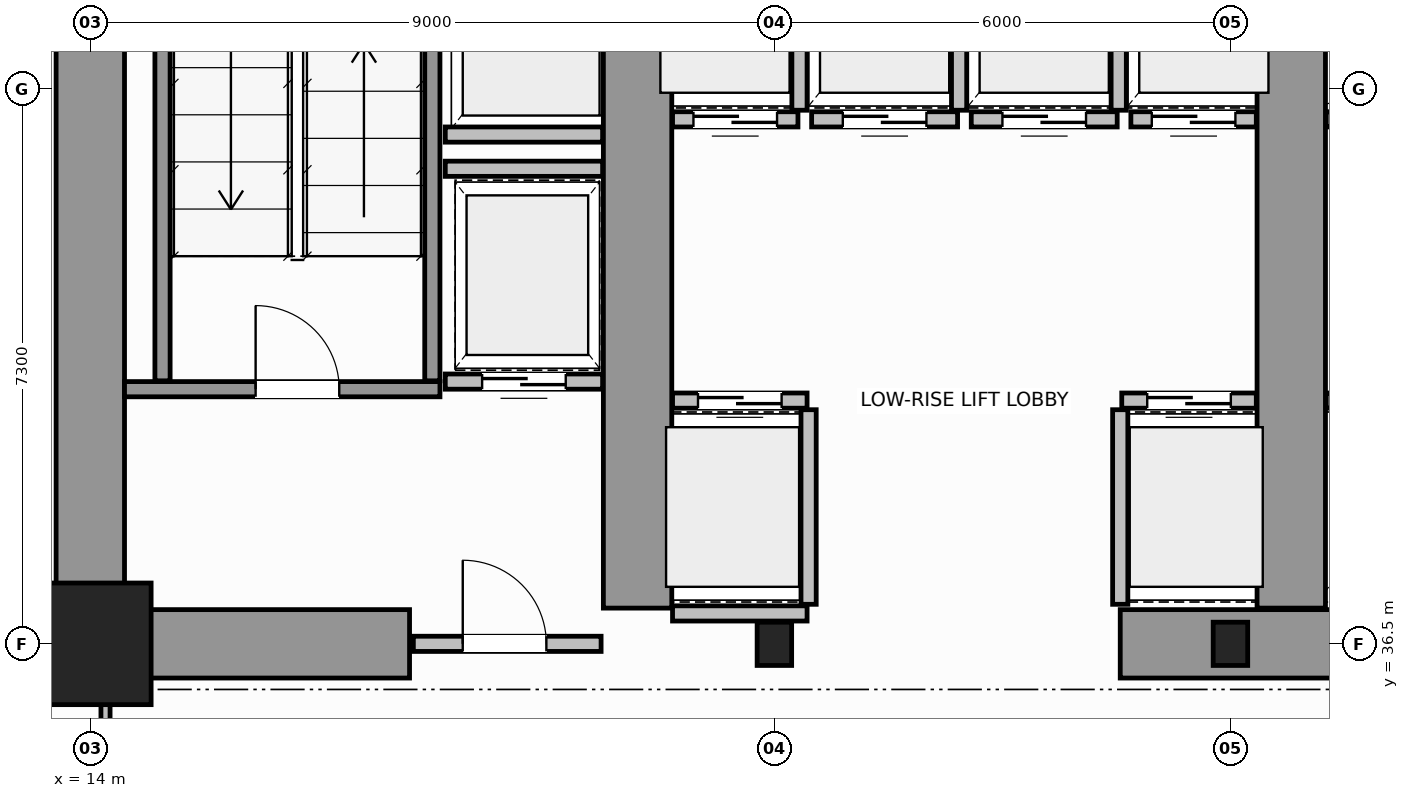
"""IFC4 building model, lengths in metres.
Left out: names, types, materials, properties, quantities, classifications, styles, units other than length and angle.
Written with IfcOpenShell. Run it as: python <this file> out.ifc"""

import sys

from ifc_helpers import new_model, si_unit, direction, frame, frame_2d, origin, origin_2d, place, context, subcontext, project, spatial, rectangle, i_section, extrude, source, transform, mapped, element, fill, save


model = new_model("IFC4")
c1 = context("Model", 3, precision=1e-05, world=origin(), true_north=direction((0.0, 1.0)))
c2 = subcontext(c1, "Body", "Model", "MODEL_VIEW")
j1 = project(units=[si_unit("LENGTHUNIT", "METRE"), si_unit("PLANEANGLEUNIT", "RADIAN")], contexts=[c1])
p1 = place(None, origin())
s1 = spatial("IfcSite", under=j1, at=p1, CompositionType="ELEMENT")
p2 = place(p1, origin())
s2 = spatial("IfcBuilding", under=s1, at=p2, CompositionType="ELEMENT")
p3 = place(p2, frame((0.0, 0.0, 53.0)))
s3 = spatial("IfcBuildingStorey", under=s2, at=p3, CompositionType="ELEMENT", Elevation=53.0)
m1 = source(origin(), c2, "Body", "SweptSolid", [
    extrude(rectangle(XDim=1.6, YDim=1.6, at=origin_2d()), origin(), (0.0, 0.0, 1.0), 3.8),
])
p4 = place(p3, frame((14.0, 36.5, 0.0), z_axis=(0.0, 0.0, 1.0), x_axis=(1.0, 0.0, 0.0)))
e1 = element("IfcColumn", 1, at=p4, inside=s3, PredefinedType="COLUMN", context=c2, shape_type="MappedRepresentation", body=[
    mapped(m1, transform((0.0, 0.0, 0.0), scale=1.0)),
])
m2 = source(origin(), c2, "Body", "SweptSolid", [
    extrude(i_section(OverallWidth=0.454, OverallDepth=0.569, WebThickness=0.078, FlangeThickness=0.08, FilletRadius=0.015, at=origin_2d()), origin(), (0.0, 0.0, 1.0), 3.8),
])
for number, where, z_axis, x_axis in (
    (2, (23.0, 36.5, 0.0), (0.0, 0.0, 1.0), (1.0, 0.0, 0.0)),
    (3, (29.0, 36.5, 0.0), (0.0, 0.0, 1.0), (1.0, 0.0, 0.0)),
):
    element("IfcColumn", number, at=place(p3, frame(where, z_axis=z_axis, x_axis=x_axis)), inside=s3, PredefinedType="COLUMN", context=c2, shape_type="MappedRepresentation", body=[
        mapped(m2, transform((0.0, 0.0, 0.0), scale=1.0)),
    ])
p5 = place(p3, frame((14.0, 36.5, 0.0), z_axis=(0.0, 0.0, 1.0), x_axis=(0.0, 1.0, 0.0)))
e4 = element("IfcWall", 4, at=p5, inside=s3, PredefinedType="SHEAR", context=c2, shape_type="SweptSolid", body=[
    extrude(rectangle(XDim=14.5, YDim=0.9, at=frame_2d((7.25, 0.0))), origin(), (0.0, 0.0, 1.0), 3.8),
])
p6 = place(p3, frame((14.47, 36.5, 0.0), z_axis=(0.0, 0.0, 1.0), x_axis=(1.0, 0.0, 0.0)))
e5 = element("IfcWall", 5, at=p6, inside=s3, PredefinedType="SHEAR", context=c2, shape_type="SweptSolid", body=[
    extrude(rectangle(XDim=3.73, YDim=0.9, at=frame_2d((1.865, 0.0))), origin(), (0.0, 0.0, 1.0), 2.38),
])
p7 = place(p3, frame((27.55, 36.5, 0.0), z_axis=(0.0, 0.0, 1.0), x_axis=(1.0, 0.0, 0.0)))
e6 = element("IfcWall", 6, at=p7, inside=s3, PredefinedType="SHEAR", context=c2, shape_type="SweptSolid", body=[
    extrude(rectangle(XDim=4.5, YDim=0.9, at=frame_2d((2.25, 0.0))), origin(), (0.0, 0.0, 1.0), 3.8),
])
for number, where, z_axis, x_axis in (
    (7, (21.2, 36.97, 0.0), (0.0, 0.0, 1.0), (0.0, 1.0, 0.0)),
    (8, (29.8, 36.97, 0.0), (0.0, 0.0, 1.0), (0.0, 1.0, 0.0)),
):
    element("IfcWall", number, at=place(p3, frame(where, z_axis=z_axis, x_axis=x_axis)), inside=s3, PredefinedType="SHEAR", context=c2, shape_type="SweptSolid", body=[
        extrude(rectangle(XDim=9.23, YDim=0.9, at=frame_2d((4.615, 0.0))), origin(), (0.0, 0.0, 1.0), 3.8),
    ])
p8 = place(p3, frame((14.45, 39.85, 0.0), z_axis=(0.0, 0.0, 1.0), x_axis=(1.0, 0.0, 0.0)))
e9 = element("IfcWall", 9, at=p8, inside=s3, PredefinedType="SOLIDWALL", context=c2, shape_type="SweptSolid", body=[
    extrude(rectangle(XDim=4.15, YDim=0.2, at=frame_2d((2.075, 0.0))), origin(), (0.0, 0.0, 1.0), 3.8),
])
p9 = place(p8, frame((1.725, 0.0, 0.0)))
e10 = element("IfcOpeningElement", 10, at=p9, cuts=e9, PredefinedType="OPENING", context=c2, shape_type="SweptSolid", body=[
    extrude(rectangle(XDim=1.1, YDim=2.15, at=frame_2d((0.55, 1.075))), frame((0.0, 0.11, 0.0), z_axis=(0.0, -1.0, 0.0), x_axis=(1.0, 0.0, 0.0)), (0.0, 0.0, 1.0), 0.22),
])
for number, where, z_axis, x_axis in (
    (11, (14.95, 39.96, 0.0), (0.0, 0.0, 1.0), (0.0, 1.0, 0.0)),
    (12, (18.5, 39.96, 0.0), (0.0, 0.0, 1.0), (0.0, 1.0, 0.0)),
):
    element("IfcWall", number, at=place(p3, frame(where, z_axis=z_axis, x_axis=x_axis)), inside=s3, PredefinedType="SOLIDWALL", context=c2, shape_type="SweptSolid", body=[
        extrude(rectangle(XDim=9.93, YDim=0.2, at=frame_2d((4.965, 0.0))), origin(), (0.0, 0.0, 1.0), 3.8),
    ])
p10 = place(p3, frame((18.25, 36.5, 0.0), z_axis=(0.0, 0.0, 1.0), x_axis=(1.0, 0.0, 0.0)))
e13 = element("IfcWall", 13, at=p10, inside=s3, PredefinedType="SOLIDWALL", context=c2, shape_type="SweptSolid", body=[
    extrude(rectangle(XDim=2.47, YDim=0.2, at=frame_2d((1.235, 0.0))), origin(), (0.0, 0.0, 1.0), 2.37),
])
p11 = place(p10, frame((0.65, 0.0, 0.0)))
e14 = element("IfcOpeningElement", 14, at=p11, cuts=e13, PredefinedType="OPENING", context=c2, shape_type="SweptSolid", body=[
    extrude(rectangle(XDim=1.1, YDim=2.15, at=frame_2d((0.55, 1.075))), frame((0.0, 0.11, 0.0), z_axis=(0.0, -1.0, 0.0), x_axis=(1.0, 0.0, 0.0)), (0.0, 0.0, 1.0), 0.22),
])
p12 = place(p3, frame((21.66, 39.7, 0.0), z_axis=(0.0, 0.0, 1.0), x_axis=(1.0, 0.0, 0.0)))
e15 = element("IfcWall", 15, at=p12, inside=s3, PredefinedType="SOLIDWALL", context=c2, shape_type="SweptSolid", body=[
    extrude(rectangle(XDim=1.77, YDim=0.2, at=frame_2d((0.885, 0.0))), origin(), (0.0, 0.0, 1.0), 3.58),
])
p13 = place(p12, frame((0.335, 0.0, 0.0)))
e16 = element("IfcOpeningElement", 16, at=p13, cuts=e15, PredefinedType="OPENING", context=c2, shape_type="SweptSolid", body=[
    extrude(rectangle(XDim=1.1, YDim=2.15, at=frame_2d((0.55, 1.075))), frame((0.0, 0.11, 0.0), z_axis=(0.0, -1.0, 0.0), x_axis=(1.0, 0.0, 0.0)), (0.0, 0.0, 1.0), 0.22),
])
p14 = place(p3, frame((21.66, 36.9, 0.0), z_axis=(0.0, 0.0, 1.0), x_axis=(1.0, 0.0, 0.0)))
e17 = element("IfcWall", 17, at=p14, inside=s3, PredefinedType="SOLIDWALL", context=c2, shape_type="SweptSolid", body=[
    extrude(rectangle(XDim=1.77, YDim=0.2, at=frame_2d((0.885, 0.0))), origin(), (0.0, 0.0, 1.0), 2.37),
])
p15 = place(p3, frame((23.45, 37.02, 0.0), z_axis=(0.0, 0.0, 1.0), x_axis=(0.0, 1.0, 0.0)))
e18 = element("IfcWall", 18, at=p15, inside=s3, PredefinedType="SOLIDWALL", context=c2, shape_type="SweptSolid", body=[
    extrude(rectangle(XDim=2.56, YDim=0.2, at=frame_2d((1.28, 0.0))), origin(), (0.0, 0.0, 1.0), 3.58),
])
p16 = place(p3, frame((27.57, 39.7, 0.0), z_axis=(0.0, 0.0, 1.0), x_axis=(1.0, 0.0, 0.0)))
e19 = element("IfcWall", 19, at=p16, inside=s3, PredefinedType="SOLIDWALL", context=c2, shape_type="SweptSolid", body=[
    extrude(rectangle(XDim=1.77, YDim=0.2, at=frame_2d((0.885, 0.0))), origin(), (0.0, 0.0, 1.0), 3.58),
])
p17 = place(p16, frame((0.335, 0.0, 0.0)))
e20 = element("IfcOpeningElement", 20, at=p17, cuts=e19, PredefinedType="OPENING", context=c2, shape_type="SweptSolid", body=[
    extrude(rectangle(XDim=1.1, YDim=2.15, at=frame_2d((0.55, 1.075))), frame((0.0, 0.11, 0.0), z_axis=(0.0, -1.0, 0.0), x_axis=(1.0, 0.0, 0.0)), (0.0, 0.0, 1.0), 0.22),
])
p18 = place(p3, frame((27.55, 37.02, 0.0), z_axis=(0.0, 0.0, 1.0), x_axis=(0.0, 1.0, 0.0)))
e21 = element("IfcWall", 21, at=p18, inside=s3, PredefinedType="SOLIDWALL", context=c2, shape_type="SweptSolid", body=[
    extrude(rectangle(XDim=2.56, YDim=0.2, at=frame_2d((1.28, 0.0))), origin(), (0.0, 0.0, 1.0), 3.58),
])
p19 = place(p3, frame((21.66, 43.4, 0.0), z_axis=(0.0, 0.0, 1.0), x_axis=(1.0, 0.0, 0.0)))
e22 = element("IfcWall", 22, at=p19, inside=s3, PredefinedType="SOLIDWALL", context=c2, shape_type="SweptSolid", body=[
    extrude(rectangle(XDim=1.65, YDim=0.2, at=frame_2d((0.825, 0.0))), origin(), (0.0, 0.0, 1.0), 3.58),
])
p20 = place(p19, frame((0.275, 0.0, 0.0)))
e23 = element("IfcOpeningElement", 23, at=p20, cuts=e22, PredefinedType="OPENING", context=c2, shape_type="SweptSolid", body=[
    extrude(rectangle(XDim=1.1, YDim=2.15, at=frame_2d((0.55, 1.075))), frame((0.0, 0.11, 0.0), z_axis=(0.0, -1.0, 0.0), x_axis=(1.0, 0.0, 0.0)), (0.0, 0.0, 1.0), 0.22),
])
p21 = place(p3, frame((23.33, 43.52, 0.0), z_axis=(0.0, 0.0, 1.0), x_axis=(0.0, 1.0, 0.0)))
e24 = element("IfcWall", 24, at=p21, inside=s3, PredefinedType="SOLIDWALL", context=c2, shape_type="SweptSolid", body=[
    extrude(rectangle(XDim=2.56, YDim=0.2, at=frame_2d((1.28, 0.0))), origin(), (0.0, 0.0, 1.0), 3.58),
])
p22 = place(p3, frame((23.49, 43.4, 0.0), z_axis=(0.0, 0.0, 1.0), x_axis=(1.0, 0.0, 0.0)))
e25 = element("IfcWall", 25, at=p22, inside=s3, PredefinedType="SOLIDWALL", context=c2, shape_type="SweptSolid", body=[
    extrude(rectangle(XDim=1.92, YDim=0.2, at=frame_2d((0.96, 0.0))), origin(), (0.0, 0.0, 1.0), 3.58),
])
p23 = place(p22, frame((0.41, 0.0, 0.0)))
e26 = element("IfcOpeningElement", 26, at=p23, cuts=e25, PredefinedType="OPENING", context=c2, shape_type="SweptSolid", body=[
    extrude(rectangle(XDim=1.1, YDim=2.15, at=frame_2d((0.55, 1.075))), frame((0.0, 0.11, 0.0), z_axis=(0.0, -1.0, 0.0), x_axis=(1.0, 0.0, 0.0)), (0.0, 0.0, 1.0), 0.22),
])
p24 = place(p3, frame((25.43, 43.52, 0.0), z_axis=(0.0, 0.0, 1.0), x_axis=(0.0, 1.0, 0.0)))
e27 = element("IfcWall", 27, at=p24, inside=s3, PredefinedType="SOLIDWALL", context=c2, shape_type="SweptSolid", body=[
    extrude(rectangle(XDim=2.56, YDim=0.2, at=frame_2d((1.28, 0.0))), origin(), (0.0, 0.0, 1.0), 3.58),
])
p25 = place(p3, frame((25.59, 43.4, 0.0), z_axis=(0.0, 0.0, 1.0), x_axis=(1.0, 0.0, 0.0)))
e28 = element("IfcWall", 28, at=p25, inside=s3, PredefinedType="SOLIDWALL", context=c2, shape_type="SweptSolid", body=[
    extrude(rectangle(XDim=1.92, YDim=0.2, at=frame_2d((0.96, 0.0))), origin(), (0.0, 0.0, 1.0), 3.58),
])
p26 = place(p25, frame((0.41, 0.0, 0.0)))
e29 = element("IfcOpeningElement", 29, at=p26, cuts=e28, PredefinedType="OPENING", context=c2, shape_type="SweptSolid", body=[
    extrude(rectangle(XDim=1.1, YDim=2.15, at=frame_2d((0.55, 1.075))), frame((0.0, 0.11, 0.0), z_axis=(0.0, -1.0, 0.0), x_axis=(1.0, 0.0, 0.0)), (0.0, 0.0, 1.0), 0.22),
])
p27 = place(p3, frame((27.53, 43.52, 0.0), z_axis=(0.0, 0.0, 1.0), x_axis=(0.0, 1.0, 0.0)))
e30 = element("IfcWall", 30, at=p27, inside=s3, PredefinedType="SOLIDWALL", context=c2, shape_type="SweptSolid", body=[
    extrude(rectangle(XDim=2.56, YDim=0.2, at=frame_2d((1.28, 0.0))), origin(), (0.0, 0.0, 1.0), 3.58),
])
p28 = place(p3, frame((27.69, 43.4, 0.0), z_axis=(0.0, 0.0, 1.0), x_axis=(1.0, 0.0, 0.0)))
e31 = element("IfcWall", 31, at=p28, inside=s3, PredefinedType="SOLIDWALL", context=c2, shape_type="SweptSolid", body=[
    extrude(rectangle(XDim=1.65, YDim=0.2, at=frame_2d((0.825, 0.0))), origin(), (0.0, 0.0, 1.0), 3.58),
])
p29 = place(p28, frame((0.275, 0.0, 0.0)))
e32 = element("IfcOpeningElement", 32, at=p29, cuts=e31, PredefinedType="OPENING", context=c2, shape_type="SweptSolid", body=[
    extrude(rectangle(XDim=1.1, YDim=2.15, at=frame_2d((0.55, 1.075))), frame((0.0, 0.11, 0.0), z_axis=(0.0, -1.0, 0.0), x_axis=(1.0, 0.0, 0.0)), (0.0, 0.0, 1.0), 0.22),
])
p30 = place(p3, frame((30.26, 39.7, 0.0), z_axis=(0.0, 0.0, 1.0), x_axis=(1.0, 0.0, 0.0)))
e33 = element("IfcWall", 33, at=p30, inside=s3, PredefinedType="SOLIDWALL", context=c2, shape_type="SweptSolid", body=[
    extrude(rectangle(XDim=1.77, YDim=0.2, at=frame_2d((0.885, 0.0))), origin(), (0.0, 0.0, 1.0), 3.58),
])
p31 = place(p3, frame((30.26, 43.4, 0.0), z_axis=(0.0, 0.0, 1.0), x_axis=(1.0, 0.0, 0.0)))
e34 = element("IfcWall", 34, at=p31, inside=s3, PredefinedType="SOLIDWALL", context=c2, shape_type="SweptSolid", body=[
    extrude(rectangle(XDim=1.65, YDim=0.2, at=frame_2d((0.825, 0.0))), origin(), (0.0, 0.0, 1.0), 3.58),
])
p32 = place(p3, frame((18.67, 43.2, 0.0), z_axis=(0.0, 0.0, 1.0), x_axis=(1.0, 0.0, 0.0)))
e35 = element("IfcWall", 35, at=p32, inside=s3, PredefinedType="SOLIDWALL", context=c2, shape_type="SweptSolid", body=[
    extrude(rectangle(XDim=2.07, YDim=0.2, at=frame_2d((1.035, 0.0))), origin(), (0.0, 0.0, 1.0), 3.58),
])
p33 = place(p3, frame((18.67, 39.95, 0.0), z_axis=(0.0, 0.0, 1.0), x_axis=(1.0, 0.0, 0.0)))
e36 = element("IfcWall", 36, at=p33, inside=s3, PredefinedType="SOLIDWALL", context=c2, shape_type="SweptSolid", body=[
    extrude(rectangle(XDim=2.07, YDim=0.2, at=frame_2d((1.035, 0.0))), origin(), (0.0, 0.0, 1.0), 3.58),
])
p34 = place(p33, frame((0.485, 0.0, 0.0)))
e37 = element("IfcOpeningElement", 37, at=p34, cuts=e36, PredefinedType="OPENING", context=c2, shape_type="SweptSolid", body=[
    extrude(rectangle(XDim=1.1, YDim=2.15, at=frame_2d((0.55, 1.075))), frame((0.0, 0.11, 0.0), z_axis=(0.0, -1.0, 0.0), x_axis=(1.0, 0.0, 0.0)), (0.0, 0.0, 1.0), 0.22),
])
p35 = place(p3, frame((18.67, 42.75, 0.0), z_axis=(0.0, 0.0, 1.0), x_axis=(1.0, 0.0, 0.0)))
e38 = element("IfcWall", 38, at=p35, inside=s3, PredefinedType="SOLIDWALL", context=c2, shape_type="SweptSolid", body=[
    extrude(rectangle(XDim=2.07, YDim=0.2, at=frame_2d((1.035, 0.0))), origin(), (0.0, 0.0, 1.0), 3.58),
])
p36 = place(p3, frame((14.2, 34.16, 0.0), z_axis=(0.0, 0.0, 1.0), x_axis=(0.0, 1.0, 0.0)))
e39 = element("IfcWall", 39, at=p36, inside=s3, PredefinedType="PARTITIONING", context=c2, shape_type="SweptSolid", body=[
    extrude(rectangle(XDim=2.28, YDim=0.12, at=frame_2d((1.14, 0.0))), origin(), (0.0, 0.0, 1.0), 3.58),
])
p37 = place(p36, frame((0.3, 0.0, 0.0)))
e40 = element("IfcOpeningElement", 40, at=p37, cuts=e39, PredefinedType="OPENING", context=c2, shape_type="SweptSolid", body=[
    extrude(rectangle(XDim=0.9, YDim=2.15, at=frame_2d((0.45, 1.075))), frame((0.0, 0.07, 0.0), z_axis=(0.0, -1.0, 0.0), x_axis=(1.0, 0.0, 0.0)), (0.0, 0.0, 1.0), 0.14),
])
m3 = source(origin(), c2, "Body", "SweptSolid", [
    extrude(rectangle(XDim=1.1, YDim=2.15, at=frame_2d((0.55, 1.075))), frame((0.0, 0.025, 0.0), z_axis=(0.0, -1.0, 0.0), x_axis=(1.0, 0.0, 0.0)), (0.0, 0.0, 1.0), 0.05),
])
p38 = place(p9, origin())
e41 = element("IfcDoor", 41, at=p38, inside=s3, OperationType="SINGLE_SWING_LEFT", PredefinedType="DOOR", context=c2, shape_type="MappedRepresentation", body=[
    mapped(m3, transform((0.0, 0.0, 0.0), scale=1.0)),
])
fill(e10, e41)
p39 = place(p11, origin())
e42 = element("IfcDoor", 42, at=p39, inside=s3, OperationType="SINGLE_SWING_RIGHT", PredefinedType="DOOR", context=c2, shape_type="MappedRepresentation", body=[
    mapped(m3, transform((0.0, 0.0, 0.0), scale=1.0)),
])
fill(e14, e42)
p40 = place(p13, origin())
e43 = element("IfcDoor", 43, at=p40, inside=s3, OperationType="DOUBLE_DOOR_SLIDING", PredefinedType="DOOR", context=c2, shape_type="MappedRepresentation", body=[
    mapped(m3, transform((0.0, 0.0, 0.0), scale=1.0)),
])
fill(e16, e43)
p41 = place(p17, origin())
e44 = element("IfcDoor", 44, at=p41, inside=s3, OperationType="DOUBLE_DOOR_SLIDING", PredefinedType="DOOR", context=c2, shape_type="MappedRepresentation", body=[
    mapped(m3, transform((0.0, 0.0, 0.0), scale=1.0)),
])
fill(e20, e44)
p42 = place(p20, origin())
e45 = element("IfcDoor", 45, at=p42, inside=s3, OperationType="DOUBLE_DOOR_SLIDING", PredefinedType="DOOR", context=c2, shape_type="MappedRepresentation", body=[
    mapped(m3, transform((0.0, 0.0, 0.0), scale=1.0)),
])
fill(e23, e45)
p43 = place(p23, origin())
e46 = element("IfcDoor", 46, at=p43, inside=s3, OperationType="DOUBLE_DOOR_SLIDING", PredefinedType="DOOR", context=c2, shape_type="MappedRepresentation", body=[
    mapped(m3, transform((0.0, 0.0, 0.0), scale=1.0)),
])
fill(e26, e46)
p44 = place(p26, origin())
e47 = element("IfcDoor", 47, at=p44, inside=s3, OperationType="DOUBLE_DOOR_SLIDING", PredefinedType="DOOR", context=c2, shape_type="MappedRepresentation", body=[
    mapped(m3, transform((0.0, 0.0, 0.0), scale=1.0)),
])
fill(e29, e47)
p45 = place(p29, origin())
e48 = element("IfcDoor", 48, at=p45, inside=s3, OperationType="DOUBLE_DOOR_SLIDING", PredefinedType="DOOR", context=c2, shape_type="MappedRepresentation", body=[
    mapped(m3, transform((0.0, 0.0, 0.0), scale=1.0)),
])
fill(e32, e48)
p46 = place(p34, origin())
e49 = element("IfcDoor", 49, at=p46, inside=s3, OperationType="DOUBLE_DOOR_SLIDING", PredefinedType="DOOR", context=c2, shape_type="MappedRepresentation", body=[
    mapped(m3, transform((0.0, 0.0, 0.0), scale=1.0)),
])
fill(e37, e49)
save(model, sys.argv[1])
